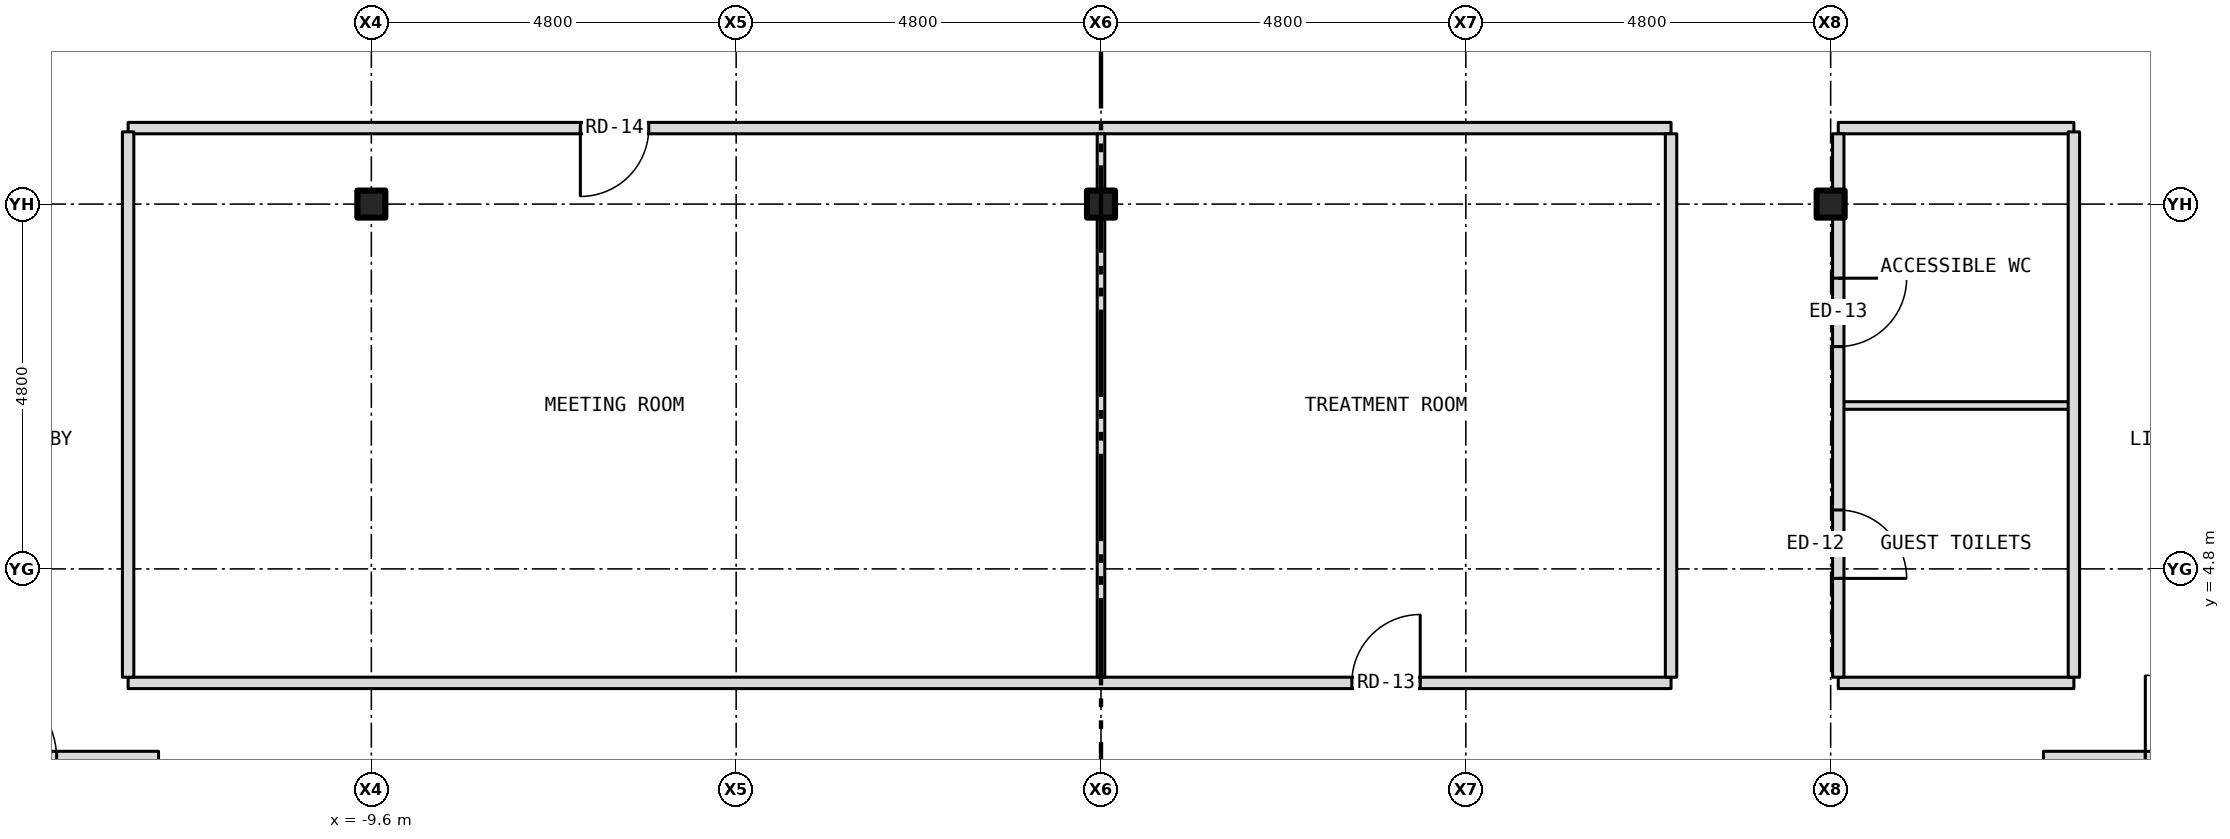
"""IFC4 building model, lengths in metres.
Left out: names, types, materials, properties, quantities, classifications, styles, units other than length and angle.
Written with IfcOpenShell. Run it as: python <this file> out.ifc"""

import sys

from ifc_helpers import new_model, si_unit, direction, frame, frame_2d, origin, origin_2d, place, context, subcontext, project, spatial, rectangle, i_section, extrude, element, fill, save


model = new_model("IFC4")
c1 = context("Model", 3, precision=1e-05, world=origin(), true_north=direction((0.0, 1.0)))
c2 = subcontext(c1, "Body", "Model", "MODEL_VIEW")
j1 = project(units=[si_unit("LENGTHUNIT", "METRE"), si_unit("PLANEANGLEUNIT", "RADIAN")], contexts=[c1])
p1 = place(None, origin())
s1 = spatial("IfcSite", under=j1, at=p1, CompositionType="ELEMENT")
p2 = place(p1, origin())
s2 = spatial("IfcBuilding", under=s1, at=p2, CompositionType="ELEMENT")
p3 = place(p2, frame((0.0, 0.0, 248.0)))
s3 = spatial("IfcBuildingStorey", under=s2, at=p3, CompositionType="ELEMENT", Elevation=248.0)
for number, where, z_axis, x_axis in (
    (1, (-9.6, 9.6, -0.15), (0.0, 0.0, 1.0), (1.0, 0.0, 0.0)),
    (2, (0.0, 9.6, -0.15), (0.0, 0.0, 1.0), (1.0, 0.0, 0.0)),
    (3, (9.6, 9.6, -0.15), (0.0, 0.0, 1.0), (1.0, 0.0, 0.0)),
):
    element("IfcColumn", number, at=place(p3, frame(where, z_axis=z_axis, x_axis=x_axis)), inside=s3, PredefinedType="COLUMN", context=c2, shape_type="SweptSolid", body=[
        extrude(i_section(OverallWidth=0.368, OverallDepth=0.356, WebThickness=0.011, FlangeThickness=0.018, at=origin_2d()), origin(), (0.0, 0.0, 1.0), 3.5),
    ])
p4 = place(p3, frame((-15.68, 2.3, 0.0), z_axis=(0.0, 0.0, 1.0), x_axis=(1.0, 0.0, 0.0)))
e4 = element("IfcWall", 4, at=p4, inside=s3, PredefinedType="PARTITIONING", context=c2, shape_type="SweptSolid", body=[
    extrude(rectangle(XDim=3.28, YDim=0.2, at=frame_2d((1.64, 0.0))), origin(), (0.0, 0.0, 1.0), 3.35),
])
p5 = place(p4, frame((0.84, 0.0, 0.0)))
e5 = element("IfcOpeningElement", 5, at=p5, cuts=e4, PredefinedType="OPENING", context=c2, shape_type="SweptSolid", body=[
    extrude(rectangle(XDim=1.1, YDim=2.1, at=frame_2d((0.55, 1.05))), frame((0.0, 0.112, 0.0), z_axis=(0.0, -1.0, 0.0), x_axis=(1.0, 0.0, 0.0)), (0.0, 0.0, 1.0), 0.224),
])
p6 = place(p3, frame((12.4, 2.3, 0.0), z_axis=(0.0, 0.0, 1.0), x_axis=(1.0, 0.0, 0.0)))
e6 = element("IfcWall", 6, at=p6, inside=s3, PredefinedType="PARTITIONING", context=c2, shape_type="SweptSolid", body=[
    extrude(rectangle(XDim=3.28, YDim=0.2, at=frame_2d((1.64, 0.0))), origin(), (0.0, 0.0, 1.0), 3.35),
])
p7 = place(p6, frame((1.34, 0.0, 0.0)))
e7 = element("IfcOpeningElement", 7, at=p7, cuts=e6, PredefinedType="OPENING", context=c2, shape_type="SweptSolid", body=[
    extrude(rectangle(XDim=1.1, YDim=2.1, at=frame_2d((0.55, 1.05))), frame((0.0, 0.112, 0.0), z_axis=(0.0, -1.0, 0.0), x_axis=(1.0, 0.0, 0.0)), (0.0, 0.0, 1.0), 0.224),
])
p8 = place(p3, frame((-12.8, 3.3, 0.0), z_axis=(0.0, 0.0, 1.0), x_axis=(1.0, 0.0, 0.0)))
e8 = element("IfcWall", 8, at=p8, inside=s3, PredefinedType="PARTITIONING", context=c2, shape_type="SweptSolid", body=[
    extrude(rectangle(XDim=20.3, YDim=0.15, at=frame_2d((10.15, 0.0))), origin(), (0.0, 0.0, 1.0), 3.35),
])
p9 = place(p8, frame((16.1, 0.0, 0.0)))
e9 = element("IfcOpeningElement", 9, at=p9, cuts=e8, PredefinedType="OPENING", context=c2, shape_type="SweptSolid", body=[
    extrude(rectangle(XDim=0.9, YDim=2.1, at=frame_2d((0.45, 1.05))), frame((0.0, 0.087, 0.0), z_axis=(0.0, -1.0, 0.0), x_axis=(1.0, 0.0, 0.0)), (0.0, 0.0, 1.0), 0.174),
])
p10 = place(p3, frame((9.7, 3.3, 0.0), z_axis=(0.0, 0.0, 1.0), x_axis=(1.0, 0.0, 0.0)))
e10 = element("IfcWall", 10, at=p10, inside=s3, PredefinedType="PARTITIONING", context=c2, shape_type="SweptSolid", body=[
    extrude(rectangle(XDim=3.1, YDim=0.15, at=frame_2d((1.55, 0.0))), origin(), (0.0, 0.0, 1.0), 3.35),
])
p11 = place(p3, frame((9.7, 6.95, 0.0), z_axis=(0.0, 0.0, 1.0), x_axis=(1.0, 0.0, 0.0)))
e11 = element("IfcWall", 11, at=p11, inside=s3, PredefinedType="PARTITIONING", context=c2, shape_type="SweptSolid", body=[
    extrude(rectangle(XDim=3.1, YDim=0.1, at=frame_2d((1.55, 0.0))), origin(), (0.0, 0.0, 1.0), 3.35),
])
p12 = place(p3, frame((-12.8, 10.6, 0.0), z_axis=(0.0, 0.0, 1.0), x_axis=(1.0, 0.0, 0.0)))
e12 = element("IfcWall", 12, at=p12, inside=s3, PredefinedType="PARTITIONING", context=c2, shape_type="SweptSolid", body=[
    extrude(rectangle(XDim=20.3, YDim=0.15, at=frame_2d((10.15, 0.0))), origin(), (0.0, 0.0, 1.0), 3.35),
])
p13 = place(p12, frame((5.95, 0.0, 0.0)))
e13 = element("IfcOpeningElement", 13, at=p13, cuts=e12, PredefinedType="OPENING", context=c2, shape_type="SweptSolid", body=[
    extrude(rectangle(XDim=0.9, YDim=2.1, at=frame_2d((0.45, 1.05))), frame((0.0, 0.087, 0.0), z_axis=(0.0, -1.0, 0.0), x_axis=(1.0, 0.0, 0.0)), (0.0, 0.0, 1.0), 0.174),
])
p14 = place(p3, frame((9.7, 10.6, 0.0), z_axis=(0.0, 0.0, 1.0), x_axis=(1.0, 0.0, 0.0)))
e14 = element("IfcWall", 14, at=p14, inside=s3, PredefinedType="PARTITIONING", context=c2, shape_type="SweptSolid", body=[
    extrude(rectangle(XDim=3.1, YDim=0.15, at=frame_2d((1.55, 0.0))), origin(), (0.0, 0.0, 1.0), 3.35),
])
p15 = place(p3, frame((-12.8, 3.375, 0.0), z_axis=(0.0, 0.0, 1.0), x_axis=(0.0, 1.0, 0.0)))
e15 = element("IfcWall", 15, at=p15, inside=s3, PredefinedType="PARTITIONING", context=c2, shape_type="SweptSolid", body=[
    extrude(rectangle(XDim=7.175, YDim=0.15, at=frame_2d((3.587, 0.0))), origin(), (0.0, 0.0, 1.0), 3.35),
])
p16 = place(p3, frame((0.0, 3.375, 0.0), z_axis=(0.0, 0.0, 1.0), x_axis=(0.0, 1.0, 0.0)))
e16 = element("IfcWall", 16, at=p16, inside=s3, PredefinedType="PARTITIONING", context=c2, shape_type="SweptSolid", body=[
    extrude(rectangle(XDim=6.041, YDim=0.1, at=frame_2d((3.021, 0.0))), origin(), (0.0, 0.0, 1.0), 2.728),
])
p17 = place(p3, frame((0.0, 9.416, 0.0), z_axis=(0.0, 0.0, 1.0), x_axis=(0.0, 1.0, 0.0)))
e17 = element("IfcWall", 17, at=p17, inside=s3, PredefinedType="PARTITIONING", context=c2, shape_type="SweptSolid", body=[
    extrude(rectangle(XDim=0.368, YDim=0.1, at=frame_2d((0.184, 0.0))), origin(), (0.0, 0.0, 1.0), 3.35),
])
p18 = place(p3, frame((0.0, 9.784, 0.0), z_axis=(0.0, 0.0, 1.0), x_axis=(0.0, 1.0, 0.0)))
e18 = element("IfcWall", 18, at=p18, inside=s3, PredefinedType="PARTITIONING", context=c2, shape_type="SweptSolid", body=[
    extrude(rectangle(XDim=0.741, YDim=0.1, at=frame_2d((0.371, 0.0))), origin(), (0.0, 0.0, 1.0), 2.728),
])
p19 = place(p3, frame((7.5, 3.375, 0.0), z_axis=(0.0, 0.0, 1.0), x_axis=(0.0, 1.0, 0.0)))
e19 = element("IfcWall", 19, at=p19, inside=s3, PredefinedType="PARTITIONING", context=c2, shape_type="SweptSolid", body=[
    extrude(rectangle(XDim=7.15, YDim=0.15, at=frame_2d((3.575, 0.0))), origin(), (0.0, 0.0, 1.0), 3.35),
])
p20 = place(p3, frame((9.7, 3.375, 0.0), z_axis=(0.0, 0.0, 1.0), x_axis=(0.0, 1.0, 0.0)))
e20 = element("IfcWall", 20, at=p20, inside=s3, PredefinedType="PARTITIONING", context=c2, shape_type="SweptSolid", body=[
    extrude(rectangle(XDim=6.041, YDim=0.15, at=frame_2d((3.021, 0.0))), origin(), (0.0, 0.0, 1.0), 2.728),
])
p21 = place(p20, frame((1.3, 0.0, 0.0)))
e21 = element("IfcOpeningElement", 21, at=p21, cuts=e20, PredefinedType="OPENING", context=c2, shape_type="SweptSolid", body=[
    extrude(rectangle(XDim=0.9, YDim=2.1, at=frame_2d((0.45, 1.05))), frame((0.0, 0.087, 0.0), z_axis=(0.0, -1.0, 0.0), x_axis=(1.0, 0.0, 0.0)), (0.0, 0.0, 1.0), 0.174),
])
p22 = place(p20, frame((4.35, 0.0, 0.0)))
e22 = element("IfcOpeningElement", 22, at=p22, cuts=e20, PredefinedType="OPENING", context=c2, shape_type="SweptSolid", body=[
    extrude(rectangle(XDim=0.9, YDim=2.1, at=frame_2d((0.45, 1.05))), frame((0.0, 0.087, 0.0), z_axis=(0.0, -1.0, 0.0), x_axis=(1.0, 0.0, 0.0)), (0.0, 0.0, 1.0), 0.174),
])
p23 = place(p3, frame((9.7, 9.416, 0.0), z_axis=(0.0, 0.0, 1.0), x_axis=(0.0, 1.0, 0.0)))
e23 = element("IfcWall", 23, at=p23, inside=s3, PredefinedType="PARTITIONING", context=c2, shape_type="SweptSolid", body=[
    extrude(rectangle(XDim=0.368, YDim=0.15, at=frame_2d((0.184, 0.0))), origin(), (0.0, 0.0, 1.0), 3.35),
])
p24 = place(p3, frame((9.7, 9.784, 0.0), z_axis=(0.0, 0.0, 1.0), x_axis=(0.0, 1.0, 0.0)))
e24 = element("IfcWall", 24, at=p24, inside=s3, PredefinedType="PARTITIONING", context=c2, shape_type="SweptSolid", body=[
    extrude(rectangle(XDim=0.741, YDim=0.15, at=frame_2d((0.371, 0.0))), origin(), (0.0, 0.0, 1.0), 2.728),
])
p25 = place(p3, frame((12.8, 3.375, 0.0), z_axis=(0.0, 0.0, 1.0), x_axis=(0.0, 1.0, 0.0)))
e25 = element("IfcWall", 25, at=p25, inside=s3, PredefinedType="PARTITIONING", context=c2, shape_type="SweptSolid", body=[
    extrude(rectangle(XDim=7.175, YDim=0.15, at=frame_2d((3.587, 0.0))), origin(), (0.0, 0.0, 1.0), 3.35),
])
p26 = place(p5, origin())
e26 = element("IfcDoor", 26, at=p26, inside=s3, OperationType="SINGLE_SWING_LEFT", PredefinedType="DOOR", context=c2, shape_type="SweptSolid", body=[
    extrude(rectangle(XDim=1.1, YDim=2.1, at=frame_2d((0.55, 1.05))), frame((0.0, 0.025, 0.0), z_axis=(0.0, -1.0, 0.0), x_axis=(1.0, 0.0, 0.0)), (0.0, 0.0, 1.0), 0.05),
])
fill(e5, e26)
p27 = place(p7, origin())
e27 = element("IfcDoor", 27, at=p27, inside=s3, OperationType="SINGLE_SWING_LEFT", PredefinedType="DOOR", context=c2, shape_type="SweptSolid", body=[
    extrude(rectangle(XDim=1.1, YDim=2.1, at=frame_2d((0.55, 1.05))), frame((0.0, 0.025, 0.0), z_axis=(0.0, -1.0, 0.0), x_axis=(1.0, 0.0, 0.0)), (0.0, 0.0, 1.0), 0.05),
])
fill(e7, e27)
p28 = place(p21, origin())
e28 = element("IfcDoor", 28, at=p28, inside=s3, OperationType="SINGLE_SWING_LEFT", PredefinedType="DOOR", context=c2, shape_type="SweptSolid", body=[
    extrude(rectangle(XDim=0.9, YDim=2.1, at=frame_2d((0.45, 1.05))), frame((0.0, 0.025, 0.0), z_axis=(0.0, -1.0, 0.0), x_axis=(1.0, 0.0, 0.0)), (0.0, 0.0, 1.0), 0.05),
])
fill(e21, e28)
p29 = place(p22, origin())
e29 = element("IfcDoor", 29, at=p29, inside=s3, OperationType="SINGLE_SWING_RIGHT", PredefinedType="DOOR", context=c2, shape_type="SweptSolid", body=[
    extrude(rectangle(XDim=0.9, YDim=2.1, at=frame_2d((0.45, 1.05))), frame((0.0, 0.025, 0.0), z_axis=(0.0, -1.0, 0.0), x_axis=(1.0, 0.0, 0.0)), (0.0, 0.0, 1.0), 0.05),
])
fill(e22, e29)
p30 = place(p9, origin())
e30 = element("IfcDoor", 30, at=p30, inside=s3, OperationType="SINGLE_SWING_RIGHT", PredefinedType="DOOR", context=c2, shape_type="SweptSolid", body=[
    extrude(rectangle(XDim=0.9, YDim=2.1, at=frame_2d((0.45, 1.05))), frame((0.0, 0.025, 0.0), z_axis=(0.0, -1.0, 0.0), x_axis=(1.0, 0.0, 0.0)), (0.0, 0.0, 1.0), 0.05),
])
fill(e9, e30)
p31 = place(p13, origin())
e31 = element("IfcDoor", 31, at=p31, inside=s3, OperationType="SINGLE_SWING_LEFT", PredefinedType="DOOR", context=c2, shape_type="SweptSolid", body=[
    extrude(rectangle(XDim=0.9, YDim=2.1, at=frame_2d((0.45, 1.05))), frame((0.0, 0.025, 0.0), z_axis=(0.0, -1.0, 0.0), x_axis=(1.0, 0.0, 0.0)), (0.0, 0.0, 1.0), 0.05),
])
fill(e13, e31)
save(model, sys.argv[1])
